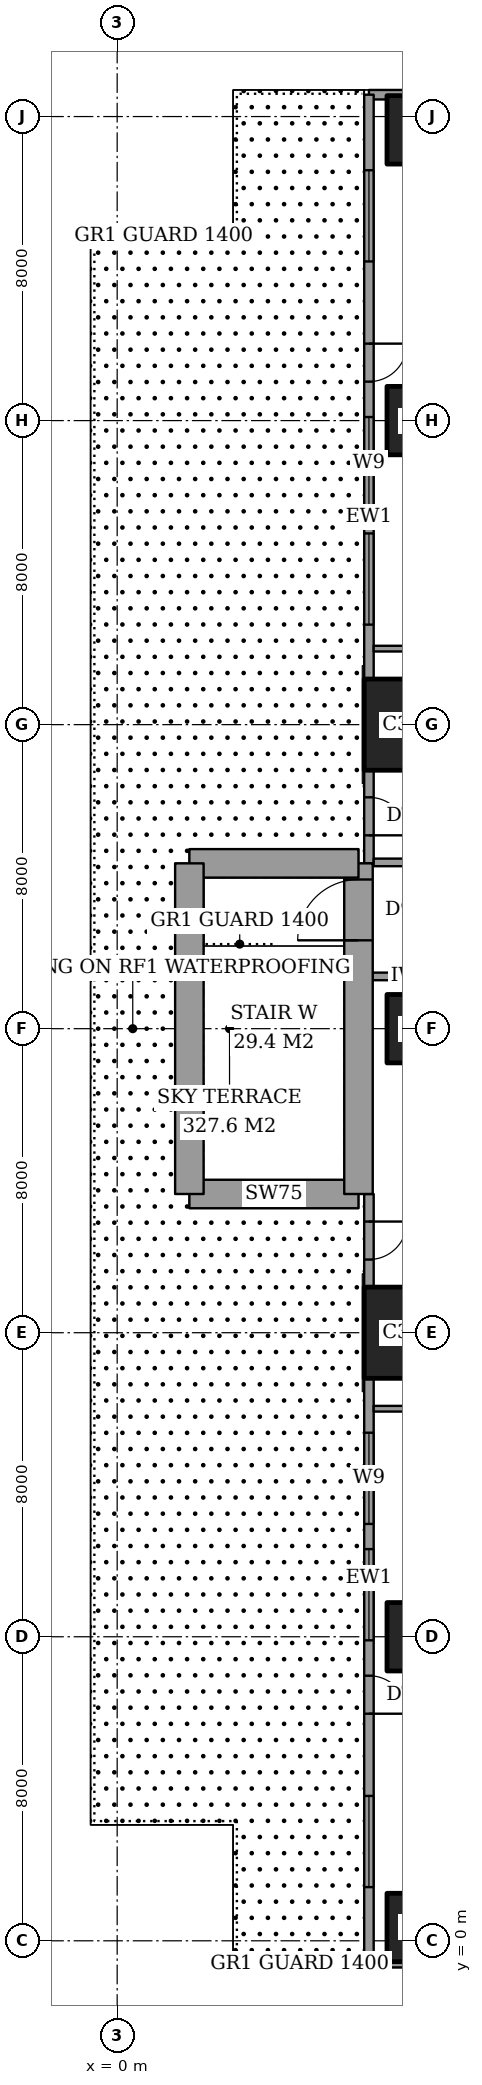
"""IFC4 building model, lengths in metres.
Left out: names, types, materials, properties, quantities, classifications, styles, units other than length and angle.
Written with IfcOpenShell. Run it as: python <this file> out.ifc"""

import sys

from ifc_helpers import new_model, si_unit, direction, frame, frame_2d, origin, origin_2d, place, context, subcontext, project, spatial, rectangle, extrude, element, fill, save


model = new_model("IFC4")
c1 = context("Model", 3, precision=1e-05, world=origin(), true_north=direction((0.0, 1.0)))
c2 = subcontext(c1, "Body", "Model", "MODEL_VIEW")
j1 = project(units=[si_unit("LENGTHUNIT", "METRE"), si_unit("PLANEANGLEUNIT", "RADIAN")], contexts=[c1])
p1 = place(None, origin())
s1 = spatial("IfcSite", under=j1, at=p1, CompositionType="ELEMENT")
p2 = place(p1, origin())
s2 = spatial("IfcBuilding", under=s1, at=p2, CompositionType="ELEMENT")
p3 = place(p2, frame((0.0, 0.0, 218.2)))
s3 = spatial("IfcBuildingStorey", under=s2, at=p3, CompositionType="ELEMENT", Elevation=218.2)
for number, where, z_axis, x_axis in (
    (1, (8.0, 0.35, 0.0), (0.0, 0.0, 1.0), (1.0, 0.0, 0.0)),
    (2, (8.0, 8.0, 0.0), (0.0, 0.0, 1.0), (1.0, 0.0, 0.0)),
):
    element("IfcColumn", number, at=place(p3, frame(where, z_axis=z_axis, x_axis=x_axis)), inside=s3, PredefinedType="COLUMN", context=c2, shape_type="SweptSolid", body=[
        extrude(rectangle(XDim=1.8, YDim=1.8, at=origin_2d()), origin(), (0.0, 0.0, 1.0), 3.6),
    ])
p4 = place(p3, frame((8.0, 16.0, 0.0), z_axis=(0.0, 0.0, 1.0), x_axis=(1.0, 0.0, 0.0)))
e3 = element("IfcColumn", 3, at=p4, inside=s3, PredefinedType="COLUMN", context=c2, shape_type="SweptSolid", body=[
    extrude(rectangle(XDim=3.0, YDim=2.4, at=origin_2d()), origin(), (0.0, 0.0, 1.0), 3.6),
])
p5 = place(p3, frame((8.0, 24.0, 0.0), z_axis=(0.0, 0.0, 1.0), x_axis=(1.0, 0.0, 0.0)))
e4 = element("IfcColumn", 4, at=p5, inside=s3, PredefinedType="COLUMN", context=c2, shape_type="SweptSolid", body=[
    extrude(rectangle(XDim=1.8, YDim=1.8, at=origin_2d()), origin(), (0.0, 0.0, 1.0), 3.6),
])
p6 = place(p3, frame((8.0, 32.0, 0.0), z_axis=(0.0, 0.0, 1.0), x_axis=(1.0, 0.0, 0.0)))
e5 = element("IfcColumn", 5, at=p6, inside=s3, PredefinedType="COLUMN", context=c2, shape_type="SweptSolid", body=[
    extrude(rectangle(XDim=3.0, YDim=2.4, at=origin_2d()), origin(), (0.0, 0.0, 1.0), 3.6),
])
for number, where, z_axis, x_axis in (
    (6, (8.0, 40.0, 0.0), (0.0, 0.0, 1.0), (1.0, 0.0, 0.0)),
    (7, (8.0, 47.65, 0.0), (0.0, 0.0, 1.0), (1.0, 0.0, 0.0)),
):
    element("IfcColumn", number, at=place(p3, frame(where, z_axis=z_axis, x_axis=x_axis)), inside=s3, PredefinedType="COLUMN", context=c2, shape_type="SweptSolid", body=[
        extrude(rectangle(XDim=1.8, YDim=1.8, at=origin_2d()), origin(), (0.0, 0.0, 1.0), 3.6),
    ])
p7 = place(p3, frame((1.9, 19.65, 0.0), z_axis=(0.0, 0.0, 1.0), x_axis=(1.0, 0.0, 0.0)))
e8 = element("IfcWall", 8, at=p7, inside=s3, PredefinedType="SHEAR", context=c2, shape_type="SweptSolid", body=[
    extrude(rectangle(XDim=4.45, YDim=0.75, at=frame_2d((2.225, 0.0))), origin(), (0.0, 0.0, 1.0), 3.6),
])
p8 = place(p3, frame((6.35, 19.65, 0.0), z_axis=(0.0, 0.0, 1.0), x_axis=(0.0, 1.0, 0.0)))
e9 = element("IfcWall", 9, at=p8, inside=s3, PredefinedType="SHEAR", context=c2, shape_type="SweptSolid", body=[
    extrude(rectangle(XDim=8.7, YDim=0.75, at=frame_2d((4.35, 0.0))), origin(), (0.0, 0.0, 1.0), 3.6),
])
p9 = place(p8, frame((6.675, 0.0, 0.0)))
e10 = element("IfcOpeningElement", 10, at=p9, cuts=e9, PredefinedType="OPENING", context=c2, shape_type="SweptSolid", body=[
    extrude(rectangle(XDim=1.6, YDim=2.1, at=frame_2d((0.8, 1.05))), frame((0.0, 0.385, 0.0), z_axis=(0.0, -1.0, 0.0), x_axis=(1.0, 0.0, 0.0)), (0.0, 0.0, 1.0), 0.77),
])
p10 = place(p3, frame((6.35, 28.35, 0.0), z_axis=(0.0, 0.0, 1.0), x_axis=(-1.0, 0.0, 0.0)))
e11 = element("IfcWall", 11, at=p10, inside=s3, PredefinedType="SHEAR", context=c2, shape_type="SweptSolid", body=[
    extrude(rectangle(XDim=4.45, YDim=0.75, at=frame_2d((2.225, 0.0))), origin(), (0.0, 0.0, 1.0), 3.6),
])
p11 = place(p3, frame((1.9, 28.35, 0.0), z_axis=(0.0, 0.0, 1.0), x_axis=(0.0, -1.0, 0.0)))
e12 = element("IfcWall", 12, at=p11, inside=s3, PredefinedType="SHEAR", context=c2, shape_type="SweptSolid", body=[
    extrude(rectangle(XDim=8.7, YDim=0.75, at=frame_2d((4.35, 0.0))), origin(), (0.0, 0.0, 1.0), 3.6),
])
p12 = place(p3, frame((24.575, 48.575, 0.0), z_axis=(0.0, 0.0, 1.0), x_axis=(-1.0, 0.0, 0.0)))
e13 = element("IfcWall", 13, at=p12, inside=s3, PredefinedType="SOLIDWALL", context=c2, shape_type="SweptSolid", body=[
    extrude(rectangle(XDim=17.95, YDim=0.25, at=frame_2d((8.975, 0.0))), origin(), (0.0, 0.0, 1.0), 3.6),
])
p13 = place(p12, frame((3.6, 0.0, 0.2)))
e14 = element("IfcOpeningElement", 14, at=p13, cuts=e13, PredefinedType="OPENING", context=c2, shape_type="SweptSolid", body=[
    extrude(rectangle(XDim=2.4, YDim=2.4, at=frame_2d((1.2, 1.2))), frame((0.0, 0.135, 0.0), z_axis=(0.0, -1.0, 0.0), x_axis=(1.0, 0.0, 0.0)), (0.0, 0.0, 1.0), 0.27),
])
p14 = place(p12, frame((11.375, 0.0, 0.2)))
e15 = element("IfcOpeningElement", 15, at=p14, cuts=e13, PredefinedType="OPENING", context=c2, shape_type="SweptSolid", body=[
    extrude(rectangle(XDim=2.4, YDim=2.4, at=frame_2d((1.2, 1.2))), frame((0.0, 0.135, 0.0), z_axis=(0.0, -1.0, 0.0), x_axis=(1.0, 0.0, 0.0)), (0.0, 0.0, 1.0), 0.27),
])
p15 = place(p3, frame((6.625, 48.575, 0.0), z_axis=(0.0, 0.0, 1.0), x_axis=(0.0, -1.0, 0.0)))
e16 = element("IfcWall", 16, at=p15, inside=s3, PredefinedType="SOLIDWALL", context=c2, shape_type="SweptSolid", body=[
    extrude(rectangle(XDim=20.225, YDim=0.25, at=frame_2d((10.112, 0.0))), origin(), (0.0, 0.0, 1.0), 3.6),
])
p16 = place(p15, frame((6.55, 0.0, 0.0)))
e17 = element("IfcOpeningElement", 17, at=p16, cuts=e16, PredefinedType="OPENING", context=c2, shape_type="SweptSolid", body=[
    extrude(rectangle(XDim=1.0, YDim=2.4, at=frame_2d((0.5, 1.2))), frame((0.0, 0.135, 0.0), z_axis=(0.0, -1.0, 0.0), x_axis=(1.0, 0.0, 0.0)), (0.0, 0.0, 1.0), 0.27),
])
p17 = place(p15, frame((1.988, 0.0, 0.2)))
e18 = element("IfcOpeningElement", 18, at=p17, cuts=e16, PredefinedType="OPENING", context=c2, shape_type="SweptSolid", body=[
    extrude(rectangle(XDim=2.4, YDim=2.4, at=frame_2d((1.2, 1.2))), frame((0.0, 0.135, 0.0), z_axis=(0.0, -1.0, 0.0), x_axis=(1.0, 0.0, 0.0)), (0.0, 0.0, 1.0), 0.27),
])
p18 = place(p15, frame((8.481, 0.0, 0.2)))
e19 = element("IfcOpeningElement", 19, at=p18, cuts=e16, PredefinedType="OPENING", context=c2, shape_type="SweptSolid", body=[
    extrude(rectangle(XDim=2.4, YDim=2.4, at=frame_2d((1.2, 1.2))), frame((0.0, 0.135, 0.0), z_axis=(0.0, -1.0, 0.0), x_axis=(1.0, 0.0, 0.0)), (0.0, 0.0, 1.0), 0.27),
])
p19 = place(p15, frame((11.544, 0.0, 0.2)))
e20 = element("IfcOpeningElement", 20, at=p19, cuts=e16, PredefinedType="OPENING", context=c2, shape_type="SweptSolid", body=[
    extrude(rectangle(XDim=2.4, YDim=2.4, at=frame_2d((1.2, 1.2))), frame((0.0, 0.135, 0.0), z_axis=(0.0, -1.0, 0.0), x_axis=(1.0, 0.0, 0.0)), (0.0, 0.0, 1.0), 0.27),
])
p20 = place(p15, frame((18.488, 0.0, 0.0)))
e21 = element("IfcOpeningElement", 21, at=p20, cuts=e16, PredefinedType="OPENING", context=c2, shape_type="SweptSolid", body=[
    extrude(rectangle(XDim=1.0, YDim=2.4, at=frame_2d((0.5, 1.2))), frame((0.0, 0.135, 0.0), z_axis=(0.0, -1.0, 0.0), x_axis=(1.0, 0.0, 0.0)), (0.0, 0.0, 1.0), 0.27),
])
p21 = place(p3, frame((6.625, 19.65, 0.0), z_axis=(0.0, 0.0, 1.0), x_axis=(0.0, -1.0, 0.0)))
e22 = element("IfcWall", 22, at=p21, inside=s3, PredefinedType="SOLIDWALL", context=c2, shape_type="SweptSolid", body=[
    extrude(rectangle(XDim=20.225, YDim=0.25, at=frame_2d((10.112, 0.0))), origin(), (0.0, 0.0, 1.0), 3.6),
])
p22 = place(p21, frame((0.725, 0.0, 0.0)))
e23 = element("IfcOpeningElement", 23, at=p22, cuts=e22, PredefinedType="OPENING", context=c2, shape_type="SweptSolid", body=[
    extrude(rectangle(XDim=1.0, YDim=2.4, at=frame_2d((0.5, 1.2))), frame((0.0, 0.135, 0.0), z_axis=(0.0, -1.0, 0.0), x_axis=(1.0, 0.0, 0.0)), (0.0, 0.0, 1.0), 0.27),
])
p23 = place(p21, frame((12.675, 0.0, 0.0)))
e24 = element("IfcOpeningElement", 24, at=p23, cuts=e22, PredefinedType="OPENING", context=c2, shape_type="SweptSolid", body=[
    extrude(rectangle(XDim=1.0, YDim=2.4, at=frame_2d((0.5, 1.2))), frame((0.0, 0.135, 0.0), z_axis=(0.0, -1.0, 0.0), x_axis=(1.0, 0.0, 0.0)), (0.0, 0.0, 1.0), 0.27),
])
p24 = place(p21, frame((6.281, 0.0, 0.2)))
e25 = element("IfcOpeningElement", 25, at=p24, cuts=e22, PredefinedType="OPENING", context=c2, shape_type="SweptSolid", body=[
    extrude(rectangle(XDim=2.4, YDim=2.4, at=frame_2d((1.2, 1.2))), frame((0.0, 0.135, 0.0), z_axis=(0.0, -1.0, 0.0), x_axis=(1.0, 0.0, 0.0)), (0.0, 0.0, 1.0), 0.27),
])
p25 = place(p21, frame((9.344, 0.0, 0.2)))
e26 = element("IfcOpeningElement", 26, at=p25, cuts=e22, PredefinedType="OPENING", context=c2, shape_type="SweptSolid", body=[
    extrude(rectangle(XDim=2.4, YDim=2.4, at=frame_2d((1.2, 1.2))), frame((0.0, 0.135, 0.0), z_axis=(0.0, -1.0, 0.0), x_axis=(1.0, 0.0, 0.0)), (0.0, 0.0, 1.0), 0.27),
])
p26 = place(p21, frame((15.837, 0.0, 0.2)))
e27 = element("IfcOpeningElement", 27, at=p26, cuts=e22, PredefinedType="OPENING", context=c2, shape_type="SweptSolid", body=[
    extrude(rectangle(XDim=2.4, YDim=2.4, at=frame_2d((1.2, 1.2))), frame((0.0, 0.135, 0.0), z_axis=(0.0, -1.0, 0.0), x_axis=(1.0, 0.0, 0.0)), (0.0, 0.0, 1.0), 0.27),
])
p27 = place(p3, frame((6.625, -0.575, 0.0), z_axis=(0.0, 0.0, 1.0), x_axis=(1.0, 0.0, 0.0)))
e28 = element("IfcWall", 28, at=p27, inside=s3, PredefinedType="SOLIDWALL", context=c2, shape_type="SweptSolid", body=[
    extrude(rectangle(XDim=17.95, YDim=0.25, at=frame_2d((8.975, 0.0))), origin(), (0.0, 0.0, 1.0), 3.6),
])
p28 = place(p27, frame((4.175, 0.0, 0.2)))
e29 = element("IfcOpeningElement", 29, at=p28, cuts=e28, PredefinedType="OPENING", context=c2, shape_type="SweptSolid", body=[
    extrude(rectangle(XDim=2.4, YDim=2.4, at=frame_2d((1.2, 1.2))), frame((0.0, 0.135, 0.0), z_axis=(0.0, -1.0, 0.0), x_axis=(1.0, 0.0, 0.0)), (0.0, 0.0, 1.0), 0.27),
])
p29 = place(p27, frame((11.95, 0.0, 0.2)))
e30 = element("IfcOpeningElement", 30, at=p29, cuts=e28, PredefinedType="OPENING", context=c2, shape_type="SweptSolid", body=[
    extrude(rectangle(XDim=2.4, YDim=2.4, at=frame_2d((1.2, 1.2))), frame((0.0, 0.135, 0.0), z_axis=(0.0, -1.0, 0.0), x_axis=(1.0, 0.0, 0.0)), (0.0, 0.0, 1.0), 0.27),
])
p30 = place(p3, frame((6.75, 14.0, 0.0), z_axis=(0.0, 0.0, 1.0), x_axis=(1.0, 0.0, 0.0)))
e31 = element("IfcWall", 31, at=p30, inside=s3, PredefinedType="PARTITIONING", context=c2, shape_type="SweptSolid", body=[
    extrude(rectangle(XDim=12.15, YDim=0.15, at=frame_2d((6.075, 0.0))), origin(), (0.0, 0.0, 1.0), 3.35),
])
p31 = place(p30, frame((5.9, 0.0, 0.0)))
e32 = element("IfcOpeningElement", 32, at=p31, cuts=e31, PredefinedType="OPENING", context=c2, shape_type="SweptSolid", body=[
    extrude(rectangle(XDim=1.8, YDim=2.1, at=frame_2d((0.9, 1.05))), frame((0.0, 0.085, 0.0), z_axis=(0.0, -1.0, 0.0), x_axis=(1.0, 0.0, 0.0)), (0.0, 0.0, 1.0), 0.17),
])
p32 = place(p3, frame((6.725, 25.375, 0.0), z_axis=(0.0, 0.0, 1.0), x_axis=(1.0, 0.0, 0.0)))
e33 = element("IfcWall", 33, at=p32, inside=s3, PredefinedType="PARTITIONING", context=c2, shape_type="SweptSolid", body=[
    extrude(rectangle(XDim=2.0, YDim=0.2, at=frame_2d((1.0, 0.0))), origin(), (0.0, 0.0, 1.0), 3.35),
])
p33 = place(p3, frame((6.75, 28.375, 0.0), z_axis=(0.0, 0.0, 1.0), x_axis=(1.0, 0.0, 0.0)))
e34 = element("IfcWall", 34, at=p33, inside=s3, PredefinedType="PARTITIONING", context=c2, shape_type="SweptSolid", body=[
    extrude(rectangle(XDim=1.975, YDim=0.2, at=frame_2d((0.988, 0.0))), origin(), (0.0, 0.0, 1.0), 3.35),
])
p34 = place(p3, frame((6.75, 34.0, 0.0), z_axis=(0.0, 0.0, 1.0), x_axis=(1.0, 0.0, 0.0)))
e35 = element("IfcWall", 35, at=p34, inside=s3, PredefinedType="PARTITIONING", context=c2, shape_type="SweptSolid", body=[
    extrude(rectangle(XDim=17.25, YDim=0.15, at=frame_2d((8.625, 0.0))), origin(), (0.0, 0.0, 1.0), 3.35),
])
p35 = place(p34, frame((5.9, 0.0, 0.0)))
e36 = element("IfcOpeningElement", 36, at=p35, cuts=e35, PredefinedType="OPENING", context=c2, shape_type="SweptSolid", body=[
    extrude(rectangle(XDim=1.8, YDim=2.1, at=frame_2d((0.9, 1.05))), frame((0.0, 0.085, 0.0), z_axis=(0.0, -1.0, 0.0), x_axis=(1.0, 0.0, 0.0)), (0.0, 0.0, 1.0), 0.17),
])
p36 = place(p16, origin())
e37 = element("IfcDoor", 37, at=p36, inside=s3, OperationType="SINGLE_SWING_RIGHT", PredefinedType="DOOR", context=c2, shape_type="SweptSolid", body=[
    extrude(rectangle(XDim=1.0, YDim=2.4, at=frame_2d((0.5, 1.2))), frame((0.0, 0.025, 0.0), z_axis=(0.0, -1.0, 0.0), x_axis=(1.0, 0.0, 0.0)), (0.0, 0.0, 1.0), 0.05),
])
fill(e17, e37)
p37 = place(p17, origin())
e38 = element("IfcWindow", 38, at=p37, inside=s3, PartitioningType="SINGLE_PANEL", PredefinedType="WINDOW", context=c2, shape_type="SweptSolid", body=[
    extrude(rectangle(XDim=2.4, YDim=2.4, at=frame_2d((1.2, 1.2))), frame((0.0, 0.03, 0.0), z_axis=(0.0, -1.0, 0.0), x_axis=(1.0, 0.0, 0.0)), (0.0, 0.0, 1.0), 0.06),
])
fill(e18, e38)
p38 = place(p18, origin())
e39 = element("IfcWindow", 39, at=p38, inside=s3, PartitioningType="SINGLE_PANEL", PredefinedType="WINDOW", context=c2, shape_type="SweptSolid", body=[
    extrude(rectangle(XDim=2.4, YDim=2.4, at=frame_2d((1.2, 1.2))), frame((0.0, 0.03, 0.0), z_axis=(0.0, -1.0, 0.0), x_axis=(1.0, 0.0, 0.0)), (0.0, 0.0, 1.0), 0.06),
])
fill(e19, e39)
p39 = place(p19, origin())
e40 = element("IfcWindow", 40, at=p39, inside=s3, PartitioningType="SINGLE_PANEL", PredefinedType="WINDOW", context=c2, shape_type="SweptSolid", body=[
    extrude(rectangle(XDim=2.4, YDim=2.4, at=frame_2d((1.2, 1.2))), frame((0.0, 0.03, 0.0), z_axis=(0.0, -1.0, 0.0), x_axis=(1.0, 0.0, 0.0)), (0.0, 0.0, 1.0), 0.06),
])
fill(e20, e40)
p40 = place(p20, origin())
e41 = element("IfcDoor", 41, at=p40, inside=s3, OperationType="SINGLE_SWING_LEFT", PredefinedType="DOOR", context=c2, shape_type="SweptSolid", body=[
    extrude(rectangle(XDim=1.0, YDim=2.4, at=frame_2d((0.5, 1.2))), frame((0.0, 0.025, 0.0), z_axis=(0.0, -1.0, 0.0), x_axis=(1.0, 0.0, 0.0)), (0.0, 0.0, 1.0), 0.05),
])
fill(e21, e41)
p41 = place(p22, origin())
e42 = element("IfcDoor", 42, at=p41, inside=s3, OperationType="SINGLE_SWING_RIGHT", PredefinedType="DOOR", context=c2, shape_type="SweptSolid", body=[
    extrude(rectangle(XDim=1.0, YDim=2.4, at=frame_2d((0.5, 1.2))), frame((0.0, 0.025, 0.0), z_axis=(0.0, -1.0, 0.0), x_axis=(1.0, 0.0, 0.0)), (0.0, 0.0, 1.0), 0.05),
])
fill(e23, e42)
p42 = place(p23, origin())
e43 = element("IfcDoor", 43, at=p42, inside=s3, OperationType="SINGLE_SWING_LEFT", PredefinedType="DOOR", context=c2, shape_type="SweptSolid", body=[
    extrude(rectangle(XDim=1.0, YDim=2.4, at=frame_2d((0.5, 1.2))), frame((0.0, 0.025, 0.0), z_axis=(0.0, -1.0, 0.0), x_axis=(1.0, 0.0, 0.0)), (0.0, 0.0, 1.0), 0.05),
])
fill(e24, e43)
p43 = place(p24, origin())
e44 = element("IfcWindow", 44, at=p43, inside=s3, PartitioningType="SINGLE_PANEL", PredefinedType="WINDOW", context=c2, shape_type="SweptSolid", body=[
    extrude(rectangle(XDim=2.4, YDim=2.4, at=frame_2d((1.2, 1.2))), frame((0.0, 0.03, 0.0), z_axis=(0.0, -1.0, 0.0), x_axis=(1.0, 0.0, 0.0)), (0.0, 0.0, 1.0), 0.06),
])
fill(e25, e44)
p44 = place(p25, origin())
e45 = element("IfcWindow", 45, at=p44, inside=s3, PartitioningType="SINGLE_PANEL", PredefinedType="WINDOW", context=c2, shape_type="SweptSolid", body=[
    extrude(rectangle(XDim=2.4, YDim=2.4, at=frame_2d((1.2, 1.2))), frame((0.0, 0.03, 0.0), z_axis=(0.0, -1.0, 0.0), x_axis=(1.0, 0.0, 0.0)), (0.0, 0.0, 1.0), 0.06),
])
fill(e26, e45)
p45 = place(p26, origin())
e46 = element("IfcWindow", 46, at=p45, inside=s3, PartitioningType="SINGLE_PANEL", PredefinedType="WINDOW", context=c2, shape_type="SweptSolid", body=[
    extrude(rectangle(XDim=2.4, YDim=2.4, at=frame_2d((1.2, 1.2))), frame((0.0, 0.03, 0.0), z_axis=(0.0, -1.0, 0.0), x_axis=(1.0, 0.0, 0.0)), (0.0, 0.0, 1.0), 0.06),
])
fill(e27, e46)
p46 = place(p9, origin())
e47 = element("IfcDoor", 47, at=p46, inside=s3, OperationType="DOUBLE_DOOR_SINGLE_SWING", PredefinedType="DOOR", context=c2, shape_type="SweptSolid", body=[
    extrude(rectangle(XDim=1.6, YDim=2.1, at=frame_2d((0.8, 1.05))), frame((0.0, 0.025, 0.0), z_axis=(0.0, -1.0, 0.0), x_axis=(1.0, 0.0, 0.0)), (0.0, 0.0, 1.0), 0.05),
])
fill(e10, e47)
save(model, sys.argv[1])
